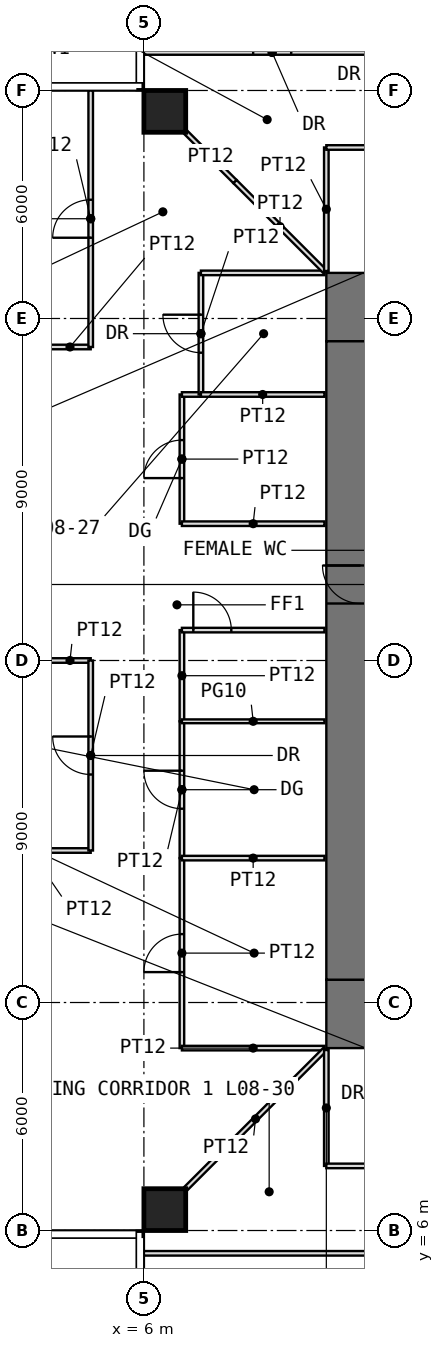
"""IFC4 building model, lengths in metres.
Left out: names, types, materials, properties, quantities, classifications, styles, units other than length and angle.
Written with IfcOpenShell. Run it as: python <this file> out.ifc"""

import sys

from ifc_helpers import new_model, si_unit, direction, frame, frame_2d, origin, origin_2d, place, context, subcontext, project, spatial, rectangle, extrude, element, fill, save


model = new_model("IFC4")
c1 = context("Model", 3, precision=1e-05, world=origin(), true_north=direction((0.0, 1.0)))
c2 = subcontext(c1, "Body", "Model", "MODEL_VIEW")
j1 = project(units=[si_unit("LENGTHUNIT", "METRE"), si_unit("PLANEANGLEUNIT", "RADIAN")], contexts=[c1])
p1 = place(None, origin())
s1 = spatial("IfcSite", under=j1, at=p1, CompositionType="ELEMENT")
p2 = place(p1, origin())
s2 = spatial("IfcBuilding", under=s1, at=p2, CompositionType="ELEMENT")
p3 = place(p2, frame((0.0, 0.0, 38.5)))
s3 = spatial("IfcBuildingStorey", under=s2, at=p3, CompositionType="ELEMENT", Elevation=38.5)
for number, where, z_axis, x_axis in (
    (1, (6.55, 6.55, 0.0), (0.0, 0.0, 1.0), (1.0, 0.0, 0.0)),
    (2, (6.55, 35.45, 0.0), (0.0, 0.0, 1.0), (1.0, 0.0, 0.0)),
):
    element("IfcColumn", number, at=place(p3, frame(where, z_axis=z_axis, x_axis=x_axis)), inside=s3, PredefinedType="COLUMN", context=c2, shape_type="SweptSolid", body=[
        extrude(rectangle(XDim=1.1, YDim=1.1, at=origin_2d()), origin(), (0.0, 0.0, 1.0), 4.0),
    ])
p4 = place(p3, frame((10.8, 11.7, -0.05), z_axis=(0.0, 0.0, 1.0), x_axis=(1.0, 0.0, 0.0)))
e3 = element("IfcWall", 3, at=p4, inside=s3, PredefinedType="SHEAR", context=c2, shape_type="SweptSolid", body=[
    extrude(rectangle(XDim=20.4, YDim=1.8, at=frame_2d((10.2, 0.0))), origin(), (0.0, 0.0, 1.0), 4.0),
])
p5 = place(p4, frame((9.2, 0.0, 0.05)))
e4 = element("IfcOpeningElement", 4, at=p5, cuts=e3, PredefinedType="OPENING", context=c2, shape_type="SweptSolid", body=[
    extrude(rectangle(XDim=2.0, YDim=2.2, at=frame_2d((1.0, 1.1))), frame((0.0, 0.91, 0.0), z_axis=(0.0, -1.0, 0.0), x_axis=(1.0, 0.0, 0.0)), (0.0, 0.0, 1.0), 1.82),
])
p6 = place(p3, frame((10.8, 30.3, -0.05), z_axis=(0.0, 0.0, 1.0), x_axis=(1.0, 0.0, 0.0)))
e5 = element("IfcWall", 5, at=p6, inside=s3, PredefinedType="SHEAR", context=c2, shape_type="SweptSolid", body=[
    extrude(rectangle(XDim=20.4, YDim=1.8, at=frame_2d((10.2, 0.0))), origin(), (0.0, 0.0, 1.0), 4.0),
])
p7 = place(p6, frame((9.2, 0.0, 0.05)))
e6 = element("IfcOpeningElement", 6, at=p7, cuts=e5, PredefinedType="OPENING", context=c2, shape_type="SweptSolid", body=[
    extrude(rectangle(XDim=2.0, YDim=2.2, at=frame_2d((1.0, 1.1))), frame((0.0, 0.91, 0.0), z_axis=(0.0, -1.0, 0.0), x_axis=(1.0, 0.0, 0.0)), (0.0, 0.0, 1.0), 1.82),
])
p8 = place(p3, frame((11.7, 12.6, -0.05), z_axis=(0.0, 0.0, 1.0), x_axis=(0.0, 1.0, 0.0)))
e7 = element("IfcWall", 7, at=p8, inside=s3, PredefinedType="SHEAR", context=c2, shape_type="SweptSolid", body=[
    extrude(rectangle(XDim=16.8, YDim=1.8, at=frame_2d((8.4, 0.0))), origin(), (0.0, 0.0, 1.0), 4.0),
])
p9 = place(p8, frame((9.9, 0.0, 0.05)))
e8 = element("IfcOpeningElement", 8, at=p9, cuts=e7, PredefinedType="OPENING", context=c2, shape_type="SweptSolid", body=[
    extrude(rectangle(XDim=1.0, YDim=2.2, at=frame_2d((0.5, 1.1))), frame((0.0, 0.91, 0.0), z_axis=(0.0, -1.0, 0.0), x_axis=(1.0, 0.0, 0.0)), (0.0, 0.0, 1.0), 1.82),
])
p10 = place(p3, frame((1.41, 16.0, 0.0), z_axis=(0.0, 0.0, 1.0), x_axis=(1.0, 0.0, 0.0)))
e9 = element("IfcWall", 9, at=p10, inside=s3, PredefinedType="PARTITIONING", context=c2, shape_type="SweptSolid", body=[
    extrude(rectangle(XDim=3.19, YDim=0.12, at=frame_2d((1.595, 0.0))), origin(), (0.0, 0.0, 1.0), 3.75),
])
for number, where, z_axis, x_axis in (
    (10, (3.51, 21.0, 0.0), (0.0, 0.0, 1.0), (1.0, 0.0, 0.0)),
    (11, (3.51, 29.25, 0.0), (0.0, 0.0, 1.0), (1.0, 0.0, 0.0)),
):
    element("IfcWall", number, at=place(p3, frame(where, z_axis=z_axis, x_axis=x_axis)), inside=s3, PredefinedType="PARTITIONING", context=c2, shape_type="SweptSolid", body=[
        extrude(rectangle(XDim=1.09, YDim=0.12, at=frame_2d((0.545, 0.0))), origin(), (0.0, 0.0, 1.0), 3.75),
    ])
p11 = place(p3, frame((4.6, 16.0, 0.0), z_axis=(0.0, 0.0, 1.0), x_axis=(0.0, 1.0, 0.0)))
e12 = element("IfcWall", 12, at=p11, inside=s3, PredefinedType="PARTITIONING", context=c2, shape_type="SweptSolid", body=[
    extrude(rectangle(XDim=5.0, YDim=0.12, at=frame_2d((2.5, 0.0))), origin(), (0.0, 0.0, 1.0), 3.75),
])
p12 = place(p11, frame((2.0, 0.0, 0.0)))
e13 = element("IfcOpeningElement", 13, at=p12, cuts=e12, PredefinedType="OPENING", context=c2, shape_type="SweptSolid", body=[
    extrude(rectangle(XDim=1.0, YDim=2.2, at=frame_2d((0.5, 1.1))), frame((0.0, 0.07, 0.0), z_axis=(0.0, -1.0, 0.0), x_axis=(1.0, 0.0, 0.0)), (0.0, 0.0, 1.0), 0.14),
])
p13 = place(p3, frame((4.6, 29.25, 0.0), z_axis=(0.0, 0.0, 1.0), x_axis=(0.0, 1.0, 0.0)))
e14 = element("IfcWall", 14, at=p13, inside=s3, PredefinedType="PARTITIONING", context=c2, shape_type="SweptSolid", body=[
    extrude(rectangle(XDim=6.75, YDim=0.12, at=frame_2d((3.375, 0.0))), origin(), (0.0, 0.0, 1.0), 3.75),
])
p14 = place(p13, frame((2.875, 0.0, 0.0)))
e15 = element("IfcOpeningElement", 15, at=p14, cuts=e14, PredefinedType="OPENING", context=c2, shape_type="SweptSolid", body=[
    extrude(rectangle(XDim=1.0, YDim=2.2, at=frame_2d((0.5, 1.1))), frame((0.0, 0.07, 0.0), z_axis=(0.0, -1.0, 0.0), x_axis=(1.0, 0.0, 0.0)), (0.0, 0.0, 1.0), 0.14),
])
p15 = place(p3, frame((6.0, 5.4, 0.0), z_axis=(0.0, 0.0, 1.0), x_axis=(1.0, 0.0, 0.0)))
e16 = element("IfcWall", 16, at=p15, inside=s3, PredefinedType="PARTITIONING", context=c2, shape_type="SweptSolid", body=[
    extrude(rectangle(XDim=27.0, YDim=0.12, at=frame_2d((13.5, 0.0))), origin(), (0.0, 0.0, 1.0), 3.75),
])
p16 = place(p15, frame((14.8, 0.0, 0.0)))
e17 = element("IfcOpeningElement", 17, at=p16, cuts=e16, PredefinedType="OPENING", context=c2, shape_type="SweptSolid", body=[
    extrude(rectangle(XDim=1.0, YDim=2.4, at=frame_2d((0.5, 1.2))), frame((0.0, 0.07, 0.0), z_axis=(0.0, -1.0, 0.0), x_axis=(1.0, 0.0, 0.0)), (0.0, 0.0, 1.0), 0.14),
])
p17 = place(p3, frame((6.0, 37.0, 0.0), z_axis=(0.0, 0.0, 1.0), x_axis=(1.0, 0.0, 0.0)))
e18 = element("IfcWall", 18, at=p17, inside=s3, PredefinedType="PARTITIONING", context=c2, shape_type="SweptSolid", body=[
    extrude(rectangle(XDim=6.75, YDim=0.12, at=frame_2d((3.375, 0.0))), origin(), (0.0, 0.0, 1.0), 3.75),
])
p18 = place(p17, frame((2.875, 0.0, 0.0)))
e19 = element("IfcOpeningElement", 19, at=p18, cuts=e18, PredefinedType="OPENING", context=c2, shape_type="SweptSolid", body=[
    extrude(rectangle(XDim=1.0, YDim=2.2, at=frame_2d((0.5, 1.1))), frame((0.0, 0.07, 0.0), z_axis=(0.0, -1.0, 0.0), x_axis=(1.0, 0.0, 0.0)), (0.0, 0.0, 1.0), 0.14),
])
p19 = place(p3, frame((7.0, 10.8, 0.0), z_axis=(0.0, 0.0, 1.0), x_axis=(0.0, 1.0, 0.0)))
e20 = element("IfcWall", 20, at=p19, inside=s3, PredefinedType="PARTITIONING", context=c2, shape_type="SweptSolid", body=[
    extrude(rectangle(XDim=5.0, YDim=0.12, at=frame_2d((2.5, 0.0))), origin(), (0.0, 0.0, 1.0), 3.75),
])
p20 = place(p19, frame((2.0, 0.0, 0.0)))
e21 = element("IfcOpeningElement", 21, at=p20, cuts=e20, PredefinedType="OPENING", context=c2, shape_type="SweptSolid", body=[
    extrude(rectangle(XDim=1.0, YDim=2.2, at=frame_2d((0.5, 1.1))), frame((0.0, 0.07, 0.0), z_axis=(0.0, -1.0, 0.0), x_axis=(1.0, 0.0, 0.0)), (0.0, 0.0, 1.0), 0.14),
])
p21 = place(p3, frame((7.0, 10.8, 0.0), z_axis=(0.0, 0.0, 1.0), x_axis=(1.0, 0.0, 0.0)))
e22 = element("IfcWall", 22, at=p21, inside=s3, PredefinedType="PARTITIONING", context=c2, shape_type="SweptSolid", body=[
    extrude(rectangle(XDim=3.75, YDim=0.12, at=frame_2d((1.875, 0.0))), origin(), (0.0, 0.0, 1.0), 3.75),
])
p22 = place(p3, frame((7.0, 15.8, 0.0), z_axis=(0.0, 0.0, 1.0), x_axis=(0.0, 1.0, 0.0)))
e23 = element("IfcWall", 23, at=p22, inside=s3, PredefinedType="PARTITIONING", context=c2, shape_type="SweptSolid", body=[
    extrude(rectangle(XDim=3.6, YDim=0.12, at=frame_2d((1.8, 0.0))), origin(), (0.0, 0.0, 1.0), 3.75),
])
p23 = place(p22, frame((1.3, 0.0, 0.0)))
e24 = element("IfcOpeningElement", 24, at=p23, cuts=e23, PredefinedType="OPENING", context=c2, shape_type="SweptSolid", body=[
    extrude(rectangle(XDim=1.0, YDim=2.4, at=frame_2d((0.5, 1.2))), frame((0.0, 0.07, 0.0), z_axis=(0.0, -1.0, 0.0), x_axis=(1.0, 0.0, 0.0)), (0.0, 0.0, 1.0), 0.14),
])
p24 = place(p3, frame((7.0, 15.8, 0.0), z_axis=(0.0, 0.0, 1.0), x_axis=(1.0, 0.0, 0.0)))
e25 = element("IfcWall", 25, at=p24, inside=s3, PredefinedType="PARTITIONING", context=c2, shape_type="SweptSolid", body=[
    extrude(rectangle(XDim=3.75, YDim=0.12, at=frame_2d((1.875, 0.0))), origin(), (0.0, 0.0, 1.0), 3.75),
])
p25 = place(p3, frame((7.0, 19.4, 0.0), z_axis=(0.0, 0.0, 1.0), x_axis=(0.0, 1.0, 0.0)))
e26 = element("IfcWall", 26, at=p25, inside=s3, PredefinedType="PARTITIONING", context=c2, shape_type="SweptSolid", body=[
    extrude(rectangle(XDim=2.4, YDim=0.12, at=frame_2d((1.2, 0.0))), origin(), (0.0, 0.0, 1.0), 3.75),
])
p26 = place(p3, frame((7.0, 19.4, 0.0), z_axis=(0.0, 0.0, 1.0), x_axis=(1.0, 0.0, 0.0)))
e27 = element("IfcWall", 27, at=p26, inside=s3, PredefinedType="PARTITIONING", context=c2, shape_type="SweptSolid", body=[
    extrude(rectangle(XDim=3.75, YDim=0.1, at=frame_2d((1.875, 0.0))), origin(), (0.0, 0.0, 1.0), 3.75),
])
p27 = place(p3, frame((7.0, 21.8, 0.0), z_axis=(0.0, 0.0, 1.0), x_axis=(1.0, 0.0, 0.0)))
e28 = element("IfcWall", 28, at=p27, inside=s3, PredefinedType="PARTITIONING", context=c2, shape_type="SweptSolid", body=[
    extrude(rectangle(XDim=3.75, YDim=0.12, at=frame_2d((1.875, 0.0))), origin(), (0.0, 0.0, 1.0), 3.75),
])
p28 = place(p27, frame((0.3, 0.0, 0.0)))
e29 = element("IfcOpeningElement", 29, at=p28, cuts=e28, PredefinedType="OPENING", context=c2, shape_type="SweptSolid", body=[
    extrude(rectangle(XDim=1.0, YDim=2.4, at=frame_2d((0.5, 1.2))), frame((0.0, 0.07, 0.0), z_axis=(0.0, -1.0, 0.0), x_axis=(1.0, 0.0, 0.0)), (0.0, 0.0, 1.0), 0.14),
])
p29 = place(p3, frame((7.0, 24.6, 0.0), z_axis=(0.0, 0.0, 1.0), x_axis=(0.0, 1.0, 0.0)))
e30 = element("IfcWall", 30, at=p29, inside=s3, PredefinedType="PARTITIONING", context=c2, shape_type="SweptSolid", body=[
    extrude(rectangle(XDim=3.4, YDim=0.12, at=frame_2d((1.7, 0.0))), origin(), (0.0, 0.0, 1.0), 3.75),
])
p30 = place(p29, frame((1.2, 0.0, 0.0)))
e31 = element("IfcOpeningElement", 31, at=p30, cuts=e30, PredefinedType="OPENING", context=c2, shape_type="SweptSolid", body=[
    extrude(rectangle(XDim=1.0, YDim=2.4, at=frame_2d((0.5, 1.2))), frame((0.0, 0.07, 0.0), z_axis=(0.0, -1.0, 0.0), x_axis=(1.0, 0.0, 0.0)), (0.0, 0.0, 1.0), 0.14),
])
p31 = place(p3, frame((7.0, 24.6, 0.0), z_axis=(0.0, 0.0, 1.0), x_axis=(1.0, 0.0, 0.0)))
e32 = element("IfcWall", 32, at=p31, inside=s3, PredefinedType="PARTITIONING", context=c2, shape_type="SweptSolid", body=[
    extrude(rectangle(XDim=3.75, YDim=0.12, at=frame_2d((1.875, 0.0))), origin(), (0.0, 0.0, 1.0), 3.75),
])
p32 = place(p3, frame((7.0, 28.0, 0.0), z_axis=(0.0, 0.0, 1.0), x_axis=(1.0, 0.0, 0.0)))
e33 = element("IfcWall", 33, at=p32, inside=s3, PredefinedType="PARTITIONING", context=c2, shape_type="SweptSolid", body=[
    extrude(rectangle(XDim=0.5, YDim=0.12, at=frame_2d((0.25, 0.0))), origin(), (0.0, 0.0, 1.0), 3.75),
])
p33 = place(p3, frame((7.11, 7.11, 0.0), z_axis=(0.0, 0.0, 1.0), x_axis=(0.707106781187, 0.707106781187, 0.0)))
e34 = element("IfcWall", 34, at=p33, inside=s3, PredefinedType="PARTITIONING", context=c2, shape_type="SweptSolid", body=[
    extrude(rectangle(XDim=5.168, YDim=0.12, at=frame_2d((2.584, 0.0))), origin(), (0.0, 0.0, 1.0), 3.75),
])
p34 = place(p3, frame((7.11, 34.89, 0.0), z_axis=(0.0, 0.0, 1.0), x_axis=(0.707106781187, -0.707106781187, 0.0)))
e35 = element("IfcWall", 35, at=p34, inside=s3, PredefinedType="PARTITIONING", context=c2, shape_type="SweptSolid", body=[
    extrude(rectangle(XDim=1.822, YDim=0.12, at=frame_2d((0.911, 0.0))), origin(), (0.0, 0.0, 1.0), 3.75),
])
p35 = place(p3, frame((7.5, 28.0, 0.0), z_axis=(0.0, 0.0, 1.0), x_axis=(0.0, 1.0, 0.0)))
e36 = element("IfcWall", 36, at=p35, inside=s3, PredefinedType="PARTITIONING", context=c2, shape_type="SweptSolid", body=[
    extrude(rectangle(XDim=3.2, YDim=0.12, at=frame_2d((1.6, 0.0))), origin(), (0.0, 0.0, 1.0), 3.75),
])
p36 = place(p35, frame((1.1, 0.0, 0.0)))
e37 = element("IfcOpeningElement", 37, at=p36, cuts=e36, PredefinedType="OPENING", context=c2, shape_type="SweptSolid", body=[
    extrude(rectangle(XDim=1.0, YDim=2.2, at=frame_2d((0.5, 1.1))), frame((0.0, 0.07, 0.0), z_axis=(0.0, -1.0, 0.0), x_axis=(1.0, 0.0, 0.0)), (0.0, 0.0, 1.0), 0.14),
])
for number, where, z_axis, x_axis in (
    (38, (7.5, 28.0, 0.0), (0.0, 0.0, 1.0), (1.0, 0.0, 0.0)),
    (39, (7.5, 31.2, 0.0), (0.0, 0.0, 1.0), (1.0, 0.0, 0.0)),
):
    element("IfcWall", number, at=place(p3, frame(where, z_axis=z_axis, x_axis=x_axis)), inside=s3, PredefinedType="PARTITIONING", context=c2, shape_type="SweptSolid", body=[
        extrude(rectangle(XDim=3.25, YDim=0.12, at=frame_2d((1.625, 0.0))), origin(), (0.0, 0.0, 1.0), 3.75),
    ])
p37 = place(p3, frame((8.398, 33.602, 0.0), z_axis=(0.0, 0.0, 1.0), x_axis=(0.707106781187, -0.707106781187, 0.0)))
e40 = element("IfcWall", 40, at=p37, inside=s3, PredefinedType="PARTITIONING", context=c2, shape_type="SweptSolid", body=[
    extrude(rectangle(XDim=3.346, YDim=0.12, at=frame_2d((1.673, 0.0))), origin(), (0.0, 0.0, 1.0), 3.75),
])
p38 = place(p3, frame((10.8, 7.7, 0.0), z_axis=(0.0, 0.0, 1.0), x_axis=(0.0, 1.0, 0.0)))
e41 = element("IfcWall", 41, at=p38, inside=s3, PredefinedType="PARTITIONING", context=c2, shape_type="SweptSolid", body=[
    extrude(rectangle(XDim=3.05, YDim=0.12, at=frame_2d((1.525, 0.0))), origin(), (0.0, 0.0, 1.0), 3.75),
])
p39 = place(p3, frame((10.8, 7.7, 0.0), z_axis=(0.0, 0.0, 1.0), x_axis=(1.0, 0.0, 0.0)))
e42 = element("IfcWall", 42, at=p39, inside=s3, PredefinedType="PARTITIONING", context=c2, shape_type="SweptSolid", body=[
    extrude(rectangle(XDim=3.6, YDim=0.12, at=frame_2d((1.8, 0.0))), origin(), (0.0, 0.0, 1.0), 3.75),
])
p40 = place(p39, frame((1.3, 0.0, 0.0)))
e43 = element("IfcOpeningElement", 43, at=p40, cuts=e42, PredefinedType="OPENING", context=c2, shape_type="SweptSolid", body=[
    extrude(rectangle(XDim=1.0, YDim=2.2, at=frame_2d((0.5, 1.1))), frame((0.0, 0.07, 0.0), z_axis=(0.0, -1.0, 0.0), x_axis=(1.0, 0.0, 0.0)), (0.0, 0.0, 1.0), 0.14),
])
p41 = place(p3, frame((10.8, 31.25, 0.0), z_axis=(0.0, 0.0, 1.0), x_axis=(0.0, 1.0, 0.0)))
e44 = element("IfcWall", 44, at=p41, inside=s3, PredefinedType="PARTITIONING", context=c2, shape_type="SweptSolid", body=[
    extrude(rectangle(XDim=3.25, YDim=0.12, at=frame_2d((1.625, 0.0))), origin(), (0.0, 0.0, 1.0), 3.75),
])
p42 = place(p3, frame((10.8, 34.5, 0.0), z_axis=(0.0, 0.0, 1.0), x_axis=(1.0, 0.0, 0.0)))
e45 = element("IfcWall", 45, at=p42, inside=s3, PredefinedType="PARTITIONING", context=c2, shape_type="SweptSolid", body=[
    extrude(rectangle(XDim=3.4, YDim=0.12, at=frame_2d((1.7, 0.0))), origin(), (0.0, 0.0, 1.0), 3.75),
])
p43 = place(p42, frame((1.2, 0.0, 0.0)))
e46 = element("IfcOpeningElement", 46, at=p43, cuts=e45, PredefinedType="OPENING", context=c2, shape_type="SweptSolid", body=[
    extrude(rectangle(XDim=1.0, YDim=2.2, at=frame_2d((0.5, 1.1))), frame((0.0, 0.07, 0.0), z_axis=(0.0, -1.0, 0.0), x_axis=(1.0, 0.0, 0.0)), (0.0, 0.0, 1.0), 0.14),
])
p44 = place(p9, origin())
e47 = element("IfcDoor", 47, at=p44, inside=s3, OperationType="SINGLE_SWING_RIGHT", PredefinedType="DOOR", context=c2, shape_type="SweptSolid", body=[
    extrude(rectangle(XDim=1.0, YDim=2.2, at=frame_2d((0.5, 1.1))), frame((0.0, 0.025, 0.0), z_axis=(0.0, -1.0, 0.0), x_axis=(1.0, 0.0, 0.0)), (0.0, 0.0, 1.0), 0.05),
])
fill(e8, e47)
p45 = place(p18, origin())
e48 = element("IfcDoor", 48, at=p45, inside=s3, OperationType="SINGLE_SWING_RIGHT", PredefinedType="DOOR", context=c2, shape_type="SweptSolid", body=[
    extrude(rectangle(XDim=1.0, YDim=2.2, at=frame_2d((0.5, 1.1))), frame((0.0, 0.025, 0.0), z_axis=(0.0, -1.0, 0.0), x_axis=(1.0, 0.0, 0.0)), (0.0, 0.0, 1.0), 0.05),
])
fill(e19, e48)
p46 = place(p20, origin())
e49 = element("IfcDoor", 49, at=p46, inside=s3, OperationType="SINGLE_SWING_LEFT", PredefinedType="DOOR", context=c2, shape_type="SweptSolid", body=[
    extrude(rectangle(XDim=1.0, YDim=2.2, at=frame_2d((0.5, 1.1))), frame((0.0, 0.025, 0.0), z_axis=(0.0, -1.0, 0.0), x_axis=(1.0, 0.0, 0.0)), (0.0, 0.0, 1.0), 0.05),
])
fill(e21, e49)
p47 = place(p23, origin())
e50 = element("IfcDoor", 50, at=p47, inside=s3, OperationType="SINGLE_SWING_RIGHT", PredefinedType="DOOR", context=c2, shape_type="SweptSolid", body=[
    extrude(rectangle(XDim=1.0, YDim=2.4, at=frame_2d((0.5, 1.2))), frame((0.0, 0.025, 0.0), z_axis=(0.0, -1.0, 0.0), x_axis=(1.0, 0.0, 0.0)), (0.0, 0.0, 1.0), 0.05),
])
fill(e24, e50)
p48 = place(p30, origin())
e51 = element("IfcDoor", 51, at=p48, inside=s3, OperationType="SINGLE_SWING_LEFT", PredefinedType="DOOR", context=c2, shape_type="SweptSolid", body=[
    extrude(rectangle(XDim=1.0, YDim=2.4, at=frame_2d((0.5, 1.2))), frame((0.0, 0.025, 0.0), z_axis=(0.0, -1.0, 0.0), x_axis=(1.0, 0.0, 0.0)), (0.0, 0.0, 1.0), 0.05),
])
fill(e31, e51)
p49 = place(p36, origin())
e52 = element("IfcDoor", 52, at=p49, inside=s3, OperationType="SINGLE_SWING_RIGHT", PredefinedType="DOOR", context=c2, shape_type="SweptSolid", body=[
    extrude(rectangle(XDim=1.0, YDim=2.2, at=frame_2d((0.5, 1.1))), frame((0.0, 0.025, 0.0), z_axis=(0.0, -1.0, 0.0), x_axis=(1.0, 0.0, 0.0)), (0.0, 0.0, 1.0), 0.05),
])
fill(e37, e52)
p50 = place(p12, origin())
e53 = element("IfcDoor", 53, at=p50, inside=s3, OperationType="SINGLE_SWING_RIGHT", PredefinedType="DOOR", context=c2, shape_type="SweptSolid", body=[
    extrude(rectangle(XDim=1.0, YDim=2.2, at=frame_2d((0.5, 1.1))), frame((0.0, 0.025, 0.0), z_axis=(0.0, -1.0, 0.0), x_axis=(1.0, 0.0, 0.0)), (0.0, 0.0, 1.0), 0.05),
])
fill(e13, e53)
p51 = place(p14, origin())
e54 = element("IfcDoor", 54, at=p51, inside=s3, OperationType="SINGLE_SWING_LEFT", PredefinedType="DOOR", context=c2, shape_type="SweptSolid", body=[
    extrude(rectangle(XDim=1.0, YDim=2.2, at=frame_2d((0.5, 1.1))), frame((0.0, 0.025, 0.0), z_axis=(0.0, -1.0, 0.0), x_axis=(1.0, 0.0, 0.0)), (0.0, 0.0, 1.0), 0.05),
])
fill(e15, e54)
p52 = place(p28, origin())
e55 = element("IfcDoor", 55, at=p52, inside=s3, OperationType="SINGLE_SWING_LEFT", PredefinedType="DOOR", context=c2, shape_type="SweptSolid", body=[
    extrude(rectangle(XDim=1.0, YDim=2.4, at=frame_2d((0.5, 1.2))), frame((0.0, 0.025, 0.0), z_axis=(0.0, -1.0, 0.0), x_axis=(1.0, 0.0, 0.0)), (0.0, 0.0, 1.0), 0.05),
])
fill(e29, e55)
save(model, sys.argv[1])
